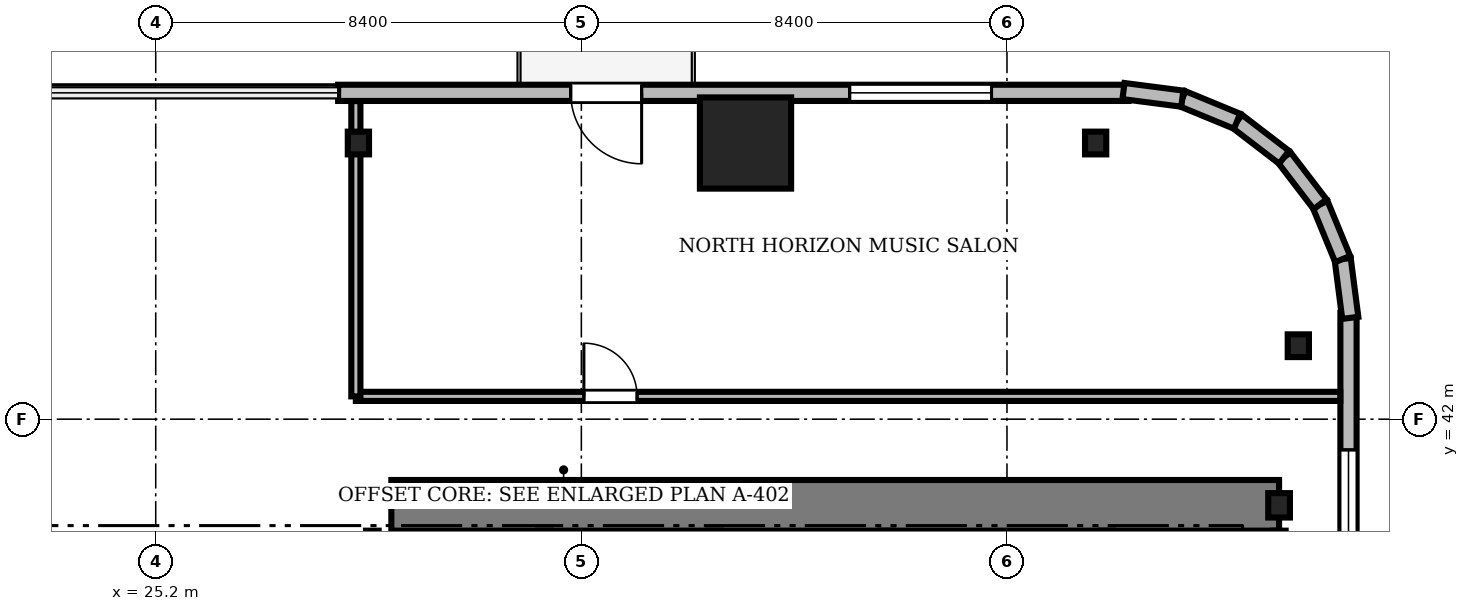
"""IFC4 building model, lengths in metres.
Left out: names, types, materials, properties, quantities, classifications, styles, units other than length and angle.
Written with IfcOpenShell. Run it as: python <this file> out.ifc"""

import sys

from ifc_helpers import new_model, si_unit, direction, frame, frame_2d, origin, origin_2d, place, context, subcontext, project, spatial, rectangle, i_section, extrude, source, transform, mapped, element, fill, save


model = new_model("IFC4")
c1 = context("Model", 3, precision=1e-05, world=origin(), true_north=direction((0.0, 1.0)))
c2 = subcontext(c1, "Body", "Model", "MODEL_VIEW")
j1 = project(units=[si_unit("LENGTHUNIT", "METRE"), si_unit("PLANEANGLEUNIT", "RADIAN")], contexts=[c1])
p1 = place(None, origin())
s1 = spatial("IfcSite", under=j1, at=p1, CompositionType="ELEMENT")
p2 = place(p1, origin())
s2 = spatial("IfcBuilding", under=s1, at=p2, CompositionType="ELEMENT")
p3 = place(p2, frame((0.0, 0.0, 42.2)))
s3 = spatial("IfcBuildingStorey", under=s2, at=p3, CompositionType="ELEMENT", Elevation=42.2)
m1 = source(origin(), c2, "Body", "SweptSolid", [
    extrude(rectangle(XDim=17.52, YDim=1.0, at=frame_2d((8.76, 0.0))), origin(), (0.0, 0.0, 1.0), 3.41),
])
p4 = place(p3, frame((29.85, 40.3, 0.0), z_axis=(0.0, 0.0, 1.0), x_axis=(1.0, 0.0, 0.0)))
e1 = element("IfcWall", 1, at=p4, inside=s3, PredefinedType="SHEAR", context=c2, shape_type="MappedRepresentation", body=[
    mapped(m1, transform((0.0, 0.0, 0.0), scale=1.0)),
])
m2 = source(origin(), c2, "Body", "SweptSolid", [
    extrude(i_section(OverallWidth=0.428, OverallDepth=0.481, WebThickness=0.04, FlangeThickness=0.063, FilletRadius=0.015, at=origin_2d()), origin(), (0.0, 0.0, 1.0), 3.41),
])
p5 = place(p3, frame((47.37, 40.3, 0.0), z_axis=(0.0, 0.0, 1.0), x_axis=(1.0, 0.0, 0.0)))
e2 = element("IfcColumn", 2, at=p5, inside=s3, PredefinedType="COLUMN", context=c2, shape_type="MappedRepresentation", body=[
    mapped(m2, transform((0.0, 0.0, 0.0), scale=1.0)),
])
m3 = source(origin(), c2, "Body", "SweptSolid", [
    extrude(rectangle(XDim=1.8, YDim=1.8, at=origin_2d()), origin(), (0.0, 0.0, 1.0), 3.41),
])
p6 = place(p3, frame((36.84, 47.45, 0.0), z_axis=(0.0, 0.0, 1.0), x_axis=(1.0, 0.0, 0.0)))
e3 = element("IfcColumn", 3, at=p6, inside=s3, PredefinedType="COLUMN", context=c2, shape_type="MappedRepresentation", body=[
    mapped(m3, transform((0.0, 0.0, 0.0), scale=1.0)),
])
m4 = source(origin(), c2, "Body", "SweptSolid", [
    extrude(i_section(OverallWidth=0.419, OverallDepth=0.449, WebThickness=0.031, FlangeThickness=0.048, FilletRadius=0.015, at=origin_2d()), origin(), (0.0, 0.0, 1.0), 3.41),
])
for number, where, z_axis, x_axis in (
    (4, (47.75, 43.45, 0.0), (0.0, 0.0, 1.0), (1.0, 0.0, 0.0)),
    (5, (43.75, 47.45, 0.0), (0.0, 0.0, 1.0), (1.0, 0.0, 0.0)),
    (6, (29.2, 47.45, 0.0), (0.0, 0.0, 1.0), (1.0, 0.0, 0.0)),
):
    element("IfcColumn", number, at=place(p3, frame(where, z_axis=z_axis, x_axis=x_axis)), inside=s3, PredefinedType="COLUMN", context=c2, shape_type="MappedRepresentation", body=[
        mapped(m4, transform((0.0, 0.0, 0.0), scale=1.0)),
    ])
m5 = source(origin(), c2, "Body", "SweptSolid", [
    extrude(rectangle(XDim=15.6, YDim=0.32, at=frame_2d((7.8, 0.0))), origin(), (0.0, 0.0, 1.0), 3.41),
])
p7 = place(p3, frame((44.4, 48.44, 0.0), z_axis=(0.0, 0.0, 1.0), x_axis=(-1.0, 0.0, 0.0)))
e7 = element("IfcWall", 7, at=p7, inside=s3, PredefinedType="SOLIDWALL", context=c2, shape_type="MappedRepresentation", body=[
    mapped(m5, transform((0.0, 0.0, 0.0), scale=1.0)),
])
m6 = source(origin(), c2, "Body", "SweptSolid", [
    extrude(rectangle(XDim=1.4, YDim=2.3, at=frame_2d((0.7, 1.15))), frame((0.0, 0.17, 0.0), z_axis=(0.0, -1.0, 0.0), x_axis=(1.0, 0.0, 0.0)), (0.0, 0.0, 1.0), 0.34),
])
p8 = place(p7, frame((9.61, 0.0, 0.0)))
e8 = element("IfcOpeningElement", 8, at=p8, cuts=e7, PredefinedType="OPENING", context=c2, shape_type="MappedRepresentation", body=[
    mapped(m6, transform((0.0, 0.0, 0.0), scale=1.0)),
])
m7 = source(origin(), c2, "Body", "SweptSolid", [
    extrude(rectangle(XDim=2.8, YDim=2.4, at=frame_2d((1.4, 1.2))), frame((0.0, 0.17, 0.0), z_axis=(0.0, -1.0, 0.0), x_axis=(1.0, 0.0, 0.0)), (0.0, 0.0, 1.0), 0.34),
])
p9 = place(p7, frame((2.705, 0.0, 0.72)))
e9 = element("IfcOpeningElement", 9, at=p9, cuts=e7, PredefinedType="OPENING", context=c2, shape_type="MappedRepresentation", body=[
    mapped(m7, transform((0.0, 0.0, 0.0), scale=1.0)),
])
m8 = source(origin(), c2, "Body", "SweptSolid", [
    extrude(rectangle(XDim=15.6, YDim=0.32, at=frame_2d((7.8, 0.0))), origin(), (0.0, 0.0, 1.0), 3.41),
])
p10 = place(p3, frame((48.74, 28.5, 0.0), z_axis=(0.0, 0.0, 1.0), x_axis=(0.0, 1.0, 0.0)))
e10 = element("IfcWall", 10, at=p10, inside=s3, PredefinedType="SOLIDWALL", context=c2, shape_type="MappedRepresentation", body=[
    mapped(m8, transform((0.0, 0.0, 0.0), scale=1.0)),
])
p11 = place(p10, frame((10.095, 0.0, 0.72)))
e11 = element("IfcOpeningElement", 11, at=p11, cuts=e10, PredefinedType="OPENING", context=c2, shape_type="MappedRepresentation", body=[
    mapped(m7, transform((0.0, 0.0, 0.0), scale=1.0)),
])
m9 = source(origin(), c2, "Body", "SweptSolid", [
    extrude(rectangle(XDim=1.17, YDim=0.32, at=frame_2d((0.585, 0.0))), origin(), (0.0, 0.0, 1.0), 3.41),
])
p12 = place(p3, frame((48.776, 44.0, 0.0), z_axis=(0.0, 0.0, 1.0), x_axis=(-0.128295670475, 0.991735963317, 0.0)))
e12 = element("IfcWall", 12, at=p12, inside=s3, PredefinedType="SOLIDWALL", context=c2, shape_type="MappedRepresentation", body=[
    mapped(m9, transform((0.0, 0.0, 0.0), scale=1.0)),
])
m10 = source(origin(), c2, "Body", "SweptSolid", [
    extrude(rectangle(XDim=1.169, YDim=0.32, at=frame_2d((0.584, 0.0))), origin(), (0.0, 0.0, 1.0), 3.41),
])
p13 = place(p3, frame((48.625, 45.16, 0.0), z_axis=(0.0, 0.0, 1.0), x_axis=(-0.381054331552, 0.924552646638, 0.0)))
e13 = element("IfcWall", 13, at=p13, inside=s3, PredefinedType="SOLIDWALL", context=c2, shape_type="MappedRepresentation", body=[
    mapped(m10, transform((0.0, 0.0, 0.0), scale=1.0)),
])
m11 = source(origin(), c2, "Body", "SweptSolid", [
    extrude(rectangle(XDim=1.169, YDim=0.32, at=frame_2d((0.584, 0.0))), origin(), (0.0, 0.0, 1.0), 3.41),
])
p14 = place(p3, frame((48.18, 46.241, 0.0), z_axis=(0.0, 0.0, 1.0), x_axis=(-0.608387696831, 0.793639975269, 0.0)))
e14 = element("IfcWall", 14, at=p14, inside=s3, PredefinedType="SOLIDWALL", context=c2, shape_type="MappedRepresentation", body=[
    mapped(m11, transform((0.0, 0.0, 0.0), scale=1.0)),
])
m12 = source(origin(), c2, "Body", "SweptSolid", [
    extrude(rectangle(XDim=1.169, YDim=0.32, at=frame_2d((0.584, 0.0))), origin(), (0.0, 0.0, 1.0), 3.41),
])
p15 = place(p3, frame((47.469, 47.169, 0.0), z_axis=(0.0, 0.0, 1.0), x_axis=(-0.793663520347, 0.608356981114, 0.0)))
e15 = element("IfcWall", 15, at=p15, inside=s3, PredefinedType="SOLIDWALL", context=c2, shape_type="MappedRepresentation", body=[
    mapped(m12, transform((0.0, 0.0, 0.0), scale=1.0)),
])
p16 = place(p3, frame((46.541, 47.88, 0.0), z_axis=(0.0, 0.0, 1.0), x_axis=(-0.924552646638, 0.381054331552, 0.0)))
e16 = element("IfcWall", 16, at=p16, inside=s3, PredefinedType="SOLIDWALL", context=c2, shape_type="MappedRepresentation", body=[
    mapped(m10, transform((0.0, 0.0, 0.0), scale=1.0)),
])
p17 = place(p3, frame((45.46, 48.325, 0.0), z_axis=(0.0, 0.0, 1.0), x_axis=(-0.991735963317, 0.128295670475, 0.0)))
e17 = element("IfcWall", 17, at=p17, inside=s3, PredefinedType="SOLIDWALL", context=c2, shape_type="MappedRepresentation", body=[
    mapped(m9, transform((0.0, 0.0, 0.0), scale=1.0)),
])
m13 = source(origin(), c2, "Body", "SweptSolid", [
    extrude(rectangle(XDim=9.15, YDim=0.25, at=frame_2d((4.575, 0.0))), origin(), (0.0, 0.0, 1.0), 3.45),
])
for number, where, z_axis, x_axis in (
    (18, (29.475, 30.65, 0.0), (0.0, 0.0, 1.0), (0.0, 1.0, 0.0)),
    (19, (32.875, 30.65, 0.0), (0.0, 0.0, 1.0), (0.0, 1.0, 0.0)),
    (20, (36.225, 30.65, 0.0), (0.0, 0.0, 1.0), (0.0, 1.0, 0.0)),
    (21, (39.625, 30.65, 0.0), (0.0, 0.0, 1.0), (0.0, 1.0, 0.0)),
    (22, (43.975, 30.65, 0.0), (0.0, 0.0, 1.0), (0.0, 1.0, 0.0)),
    (23, (47.375, 30.65, 0.0), (0.0, 0.0, 1.0), (0.0, 1.0, 0.0)),
):
    element("IfcWall", number, at=place(p3, frame(where, z_axis=z_axis, x_axis=x_axis)), inside=s3, PredefinedType="SOLIDWALL", context=c2, shape_type="MappedRepresentation", body=[
        mapped(m13, transform((0.0, 0.0, 0.0), scale=1.0)),
    ])
m14 = source(origin(), c2, "Body", "SweptSolid", [
    extrude(rectangle(XDim=19.428, YDim=0.18, at=frame_2d((9.714, 0.0))), origin(), (0.0, 0.0, 1.0), 2.652),
])
p18 = place(p3, frame((29.15, 42.45, 0.0), z_axis=(0.0, 0.0, 1.0), x_axis=(1.0, 0.0, 0.0)))
e24 = element("IfcWall", 24, at=p18, inside=s3, PredefinedType="PARTITIONING", context=c2, shape_type="MappedRepresentation", body=[
    mapped(m14, transform((0.0, 0.0, 0.0), scale=1.0)),
])
m15 = source(origin(), c2, "Body", "SweptSolid", [
    extrude(rectangle(XDim=1.05, YDim=2.2, at=frame_2d((0.525, 1.1))), frame((0.0, 0.1, 0.0), z_axis=(0.0, -1.0, 0.0), x_axis=(1.0, 0.0, 0.0)), (0.0, 0.0, 1.0), 0.2),
])
p19 = place(p18, frame((4.5, 0.0, 0.0)))
e25 = element("IfcOpeningElement", 25, at=p19, cuts=e24, PredefinedType="OPENING", context=c2, shape_type="MappedRepresentation", body=[
    mapped(m15, transform((0.0, 0.0, 0.0), scale=1.0)),
])
m16 = source(origin(), c2, "Body", "SweptSolid", [
    extrude(rectangle(XDim=5.828, YDim=0.18, at=frame_2d((2.914, 0.0))), origin(), (0.0, 0.0, 1.0), 2.652),
])
p20 = place(p3, frame((29.15, 42.45, 0.0), z_axis=(0.0, 0.0, 1.0), x_axis=(0.0, 1.0, 0.0)))
e26 = element("IfcWall", 26, at=p20, inside=s3, PredefinedType="PARTITIONING", context=c2, shape_type="MappedRepresentation", body=[
    mapped(m16, transform((0.0, 0.0, 0.0), scale=1.0)),
])
m17 = source(origin(), c2, "Body", "SweptSolid", [
    extrude(rectangle(XDim=1.4, YDim=2.3, at=frame_2d((0.7, 1.15))), frame((0.0, 0.025, 0.0), z_axis=(0.0, -1.0, 0.0), x_axis=(1.0, 0.0, 0.0)), (0.0, 0.0, 1.0), 0.05),
])
p21 = place(p8, frame((1.4, 0.0, 0.0), z_axis=(0.0, 0.0, 1.0), x_axis=(-1.0, 0.0, 0.0)))
e27 = element("IfcDoor", 27, at=p21, inside=s3, OperationType="DOUBLE_DOOR_SLIDING", PredefinedType="DOOR", context=c2, shape_type="MappedRepresentation", body=[
    mapped(m17, transform((0.0, 0.0, 0.0), scale=1.0)),
])
fill(e8, e27)
m18 = source(origin(), c2, "Body", "SweptSolid", [
    extrude(rectangle(XDim=2.8, YDim=2.4, at=frame_2d((1.4, 1.2))), frame((0.0, 0.03, 0.0), z_axis=(0.0, -1.0, 0.0), x_axis=(1.0, 0.0, 0.0)), (0.0, 0.0, 1.0), 0.06),
])
p22 = place(p9, origin())
e28 = element("IfcWindow", 28, at=p22, inside=s3, PartitioningType="SINGLE_PANEL", PredefinedType="WINDOW", context=c2, shape_type="MappedRepresentation", body=[
    mapped(m18, transform((0.0, 0.0, 0.0), scale=1.0)),
])
fill(e9, e28)
p23 = place(p11, origin())
e29 = element("IfcWindow", 29, at=p23, inside=s3, PartitioningType="SINGLE_PANEL", PredefinedType="WINDOW", context=c2, shape_type="MappedRepresentation", body=[
    mapped(m18, transform((0.0, 0.0, 0.0), scale=1.0)),
])
fill(e11, e29)
m19 = source(origin(), c2, "Body", "SweptSolid", [
    extrude(rectangle(XDim=1.05, YDim=2.2, at=frame_2d((0.525, 1.1))), frame((0.0, 0.025, 0.0), z_axis=(0.0, -1.0, 0.0), x_axis=(1.0, 0.0, 0.0)), (0.0, 0.0, 1.0), 0.05),
])
p24 = place(p19, origin())
e30 = element("IfcDoor", 30, at=p24, inside=s3, OperationType="SINGLE_SWING_LEFT", PredefinedType="DOOR", context=c2, shape_type="MappedRepresentation", body=[
    mapped(m19, transform((0.0, 0.0, 0.0), scale=1.0)),
])
fill(e25, e30)
save(model, sys.argv[1])
